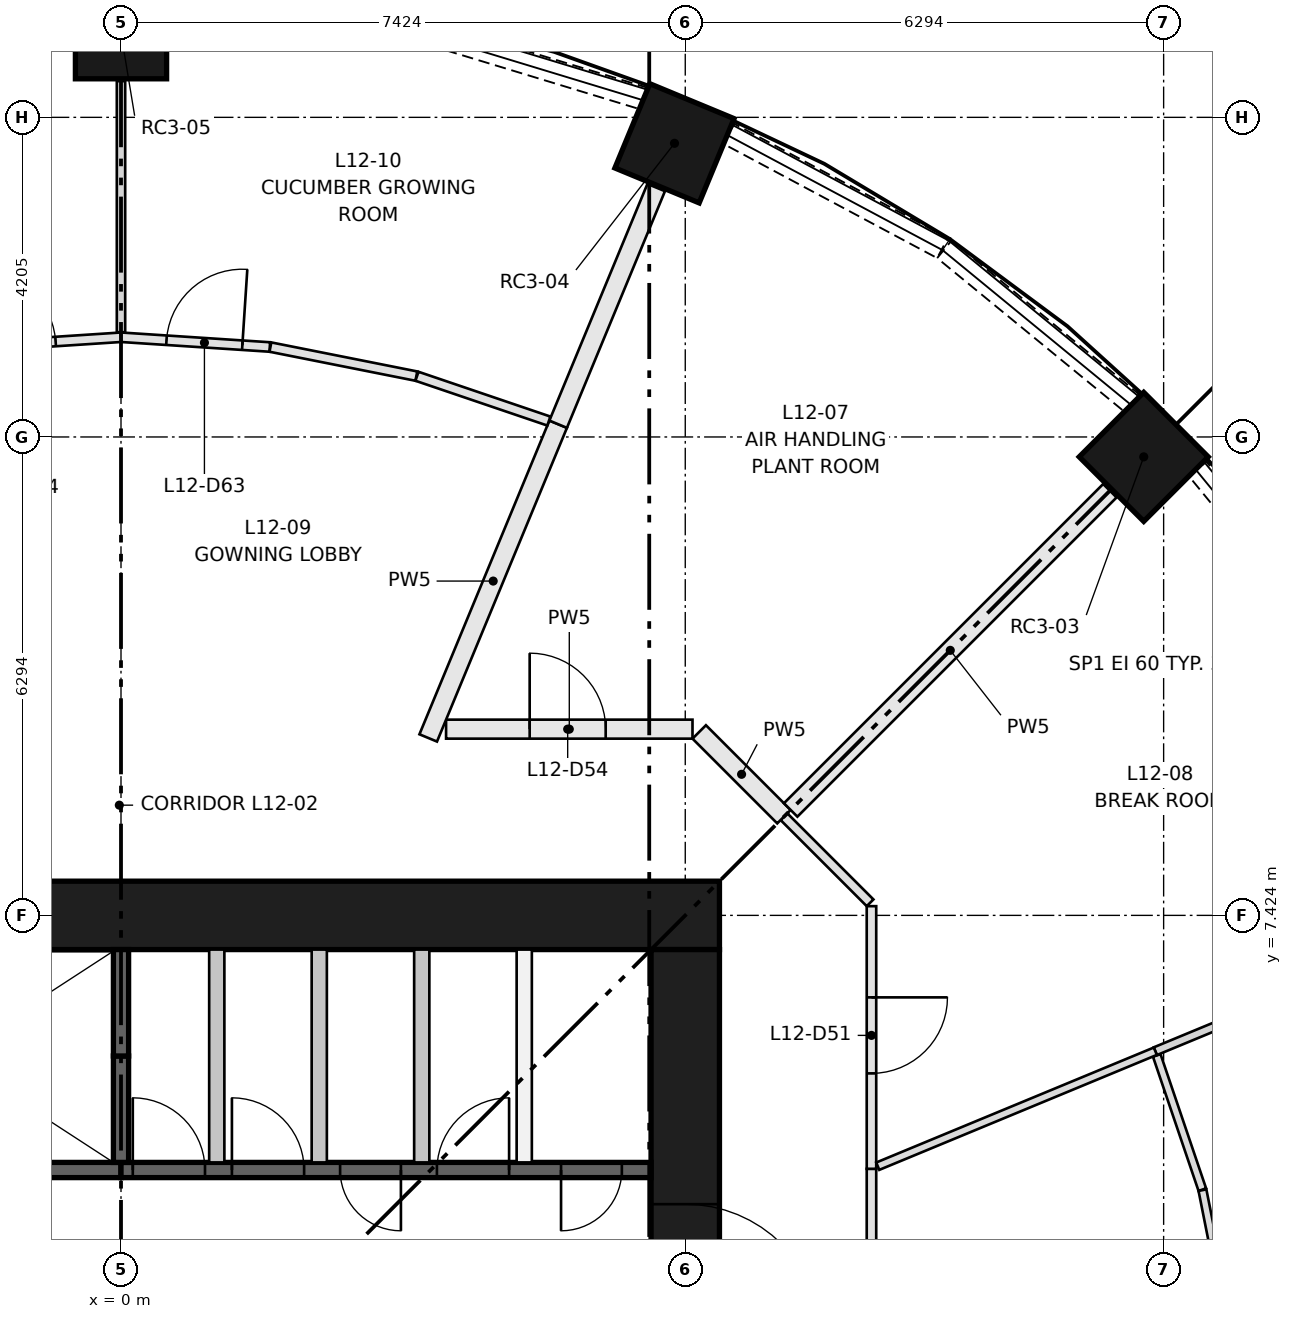
"""IFC4 building model, lengths in metres.
Left out: names, types, materials, properties, quantities, classifications, styles, units other than length and angle.
Written with IfcOpenShell. Run it as: python <this file> out.ifc"""

import sys

from ifc_helpers import new_model, si_unit, direction, frame, frame_2d, origin, origin_2d, place, context, subcontext, project, spatial, rectangle, extrude, element, fill, save


model = new_model("IFC4")
c1 = context("Model", 3, precision=1e-05, world=origin(), true_north=direction((0.0, 1.0)))
c2 = subcontext(c1, "Body", "Model", "MODEL_VIEW")
j1 = project(units=[si_unit("LENGTHUNIT", "METRE"), si_unit("PLANEANGLEUNIT", "RADIAN")], contexts=[c1])
p1 = place(None, origin())
s1 = spatial("IfcSite", under=j1, at=p1, CompositionType="ELEMENT")
p2 = place(p1, origin())
s2 = spatial("IfcBuilding", under=s1, at=p2, CompositionType="ELEMENT")
p3 = place(p2, frame((0.0, 0.0, 48.1)))
s3 = spatial("IfcBuildingStorey", under=s2, at=p3, CompositionType="ELEMENT", Elevation=48.1)
for number, where, z_axis, x_axis in (
    (1, (13.456, 13.456, 0.0), (0.0, 0.0, 1.0), (0.707, 0.707, 0.0)),
    (2, (7.282, 17.582, 0.0), (0.0, 0.0, 1.0), (0.383, 0.924, 0.0)),
    (3, (0.0, 19.03, 0.0), (0.0, 0.0, 1.0), (0.0, 1.0, 0.0)),
):
    element("IfcColumn", number, at=place(p3, frame(where, z_axis=z_axis, x_axis=x_axis)), inside=s3, PredefinedType="COLUMN", context=c2, shape_type="SweptSolid", body=[
        extrude(rectangle(XDim=1.2, YDim=1.2, at=origin_2d()), origin(), (0.0, 0.0, 1.0), 3.65),
    ])
p4 = place(p3, frame((-7.874, 7.424, 0.0), z_axis=(0.0, 0.0, 1.0), x_axis=(1.0, 0.0, 0.0)))
e4 = element("IfcWall", 4, at=p4, inside=s3, PredefinedType="SHEAR", context=c2, shape_type="SweptSolid", body=[
    extrude(rectangle(XDim=15.748, YDim=0.9, at=frame_2d((7.874, 0.0))), origin(), (0.0, 0.0, 1.0), 3.65),
])
p5 = place(p3, frame((7.424, -6.974, 0.0), z_axis=(0.0, 0.0, 1.0), x_axis=(0.0, 1.0, 0.0)))
e5 = element("IfcWall", 5, at=p5, inside=s3, PredefinedType="SHEAR", context=c2, shape_type="SweptSolid", body=[
    extrude(rectangle(XDim=13.948, YDim=0.9, at=frame_2d((6.974, 0.0))), origin(), (0.0, 0.0, 1.0), 3.65),
])
p6 = place(p5, frame((6.474, 0.0, 0.0)))
e6 = element("IfcOpeningElement", 6, at=p6, cuts=e5, PredefinedType="OPENING", context=c2, shape_type="SweptSolid", body=[
    extrude(rectangle(XDim=1.0, YDim=2.1, at=frame_2d((0.5, 1.05))), frame((0.0, 0.46, 0.0), z_axis=(0.0, -1.0, 0.0), x_axis=(1.0, 0.0, 0.0)), (0.0, 0.0, 1.0), 0.92),
])
p7 = place(p5, frame((3.35, 0.0, 0.0)))
e7 = element("IfcOpeningElement", 7, at=p7, cuts=e5, PredefinedType="OPENING", context=c2, shape_type="SweptSolid", body=[
    extrude(rectangle(XDim=1.8, YDim=2.1, at=frame_2d((0.9, 1.05))), frame((0.0, 0.46, 0.0), z_axis=(0.0, -1.0, 0.0), x_axis=(1.0, 0.0, 0.0)), (0.0, 0.0, 1.0), 0.92),
])
p8 = place(p5, frame((8.799, 0.0, 0.0)))
e8 = element("IfcOpeningElement", 8, at=p8, cuts=e5, PredefinedType="OPENING", context=c2, shape_type="SweptSolid", body=[
    extrude(rectangle(XDim=1.8, YDim=2.1, at=frame_2d((0.9, 1.05))), frame((0.0, 0.46, 0.0), z_axis=(0.0, -1.0, 0.0), x_axis=(1.0, 0.0, 0.0)), (0.0, 0.0, 1.0), 0.92),
])
p9 = place(p3, frame((-6.974, 4.074, 0.0), z_axis=(0.0, 0.0, 1.0), x_axis=(1.0, 0.0, 0.0)))
e9 = element("IfcWall", 9, at=p9, inside=s3, PredefinedType="SHEAR", context=c2, shape_type="SweptSolid", body=[
    extrude(rectangle(XDim=6.974, YDim=0.2, at=frame_2d((3.487, 0.0))), origin(), (0.0, 0.0, 1.0), 3.3),
])
p10 = place(p3, frame((0.0, 4.074, 0.0), z_axis=(0.0, 0.0, 1.0), x_axis=(1.0, 0.0, 0.0)))
e10 = element("IfcWall", 10, at=p10, inside=s3, PredefinedType="SHEAR", context=c2, shape_type="SweptSolid", body=[
    extrude(rectangle(XDim=6.974, YDim=0.2, at=frame_2d((3.487, 0.0))), origin(), (0.0, 0.0, 1.0), 3.3),
])
p11 = place(p10, frame((0.155, 0.0, 0.0)))
e11 = element("IfcOpeningElement", 11, at=p11, cuts=e10, PredefinedType="OPENING", context=c2, shape_type="SweptSolid", body=[
    extrude(rectangle(XDim=0.95, YDim=2.1, at=frame_2d((0.475, 1.05))), frame((0.0, 0.11, 0.0), z_axis=(0.0, -1.0, 0.0), x_axis=(1.0, 0.0, 0.0)), (0.0, 0.0, 1.0), 0.22),
])
p12 = place(p10, frame((1.459, 0.0, 0.0)))
e12 = element("IfcOpeningElement", 12, at=p12, cuts=e10, PredefinedType="OPENING", context=c2, shape_type="SweptSolid", body=[
    extrude(rectangle(XDim=0.95, YDim=2.1, at=frame_2d((0.475, 1.05))), frame((0.0, 0.11, 0.0), z_axis=(0.0, -1.0, 0.0), x_axis=(1.0, 0.0, 0.0)), (0.0, 0.0, 1.0), 0.22),
])
p13 = place(p10, frame((2.883, 0.0, 0.0)))
e13 = element("IfcOpeningElement", 13, at=p13, cuts=e10, PredefinedType="OPENING", context=c2, shape_type="SweptSolid", body=[
    extrude(rectangle(XDim=0.8, YDim=2.1, at=frame_2d((0.4, 1.05))), frame((0.0, 0.11, 0.0), z_axis=(0.0, -1.0, 0.0), x_axis=(1.0, 0.0, 0.0)), (0.0, 0.0, 1.0), 0.22),
])
p14 = place(p10, frame((4.156, 0.0, 0.0)))
e14 = element("IfcOpeningElement", 14, at=p14, cuts=e10, PredefinedType="OPENING", context=c2, shape_type="SweptSolid", body=[
    extrude(rectangle(XDim=0.95, YDim=2.1, at=frame_2d((0.475, 1.05))), frame((0.0, 0.11, 0.0), z_axis=(0.0, -1.0, 0.0), x_axis=(1.0, 0.0, 0.0)), (0.0, 0.0, 1.0), 0.22),
])
p15 = place(p10, frame((5.79, 0.0, 0.0)))
e15 = element("IfcOpeningElement", 15, at=p15, cuts=e10, PredefinedType="OPENING", context=c2, shape_type="SweptSolid", body=[
    extrude(rectangle(XDim=0.8, YDim=2.1, at=frame_2d((0.4, 1.05))), frame((0.0, 0.11, 0.0), z_axis=(0.0, -1.0, 0.0), x_axis=(1.0, 0.0, 0.0)), (0.0, 0.0, 1.0), 0.22),
])
p16 = place(p3, frame((0.0, 4.174, 0.0), z_axis=(0.0, 0.0, 1.0), x_axis=(0.0, 1.0, 0.0)))
e16 = element("IfcWall", 16, at=p16, inside=s3, PredefinedType="SHEAR", context=c2, shape_type="SweptSolid", body=[
    extrude(rectangle(XDim=1.4, YDim=0.2, at=frame_2d((0.7, 0.0))), origin(), (0.0, 0.0, 1.0), 3.3),
])
p17 = place(p3, frame((0.0, 5.574, 0.0), z_axis=(0.0, 0.0, 1.0), x_axis=(0.0, 1.0, 0.0)))
e17 = element("IfcWall", 17, at=p17, inside=s3, PredefinedType="SHEAR", context=c2, shape_type="SweptSolid", body=[
    extrude(rectangle(XDim=1.4, YDim=0.2, at=frame_2d((0.7, 0.0))), origin(), (0.0, 0.0, 1.0), 3.3),
])
for number, where, z_axis, x_axis in (
    (18, (1.26, 4.174, 0.0), (0.0, 0.0, 1.0), (0.0, 1.0, 0.0)),
    (19, (2.609, 4.174, 0.0), (0.0, 0.0, 1.0), (0.0, 1.0, 0.0)),
    (20, (3.957, 4.174, 0.0), (0.0, 0.0, 1.0), (0.0, 1.0, 0.0)),
    (21, (5.305, 4.174, 0.0), (0.0, 0.0, 1.0), (0.0, 1.0, 0.0)),
):
    element("IfcWall", number, at=place(p3, frame(where, z_axis=z_axis, x_axis=x_axis)), inside=s3, PredefinedType="PARTITIONING", context=c2, shape_type="SweptSolid", body=[
        extrude(rectangle(XDim=2.8, YDim=0.2, at=frame_2d((1.4, 0.0))), origin(), (0.0, 0.0, 1.0), 3.3),
    ])
for number, where, z_axis, x_axis in (
    (22, (16.188, 10.833, 0.0), (0.0, 0.0, 1.0), (-0.634, 0.773, 0.0)),
    (23, (13.298, 14.166, 0.0), (0.0, 0.0, 1.0), (-0.773, 0.634, 0.0)),
):
    element("IfcWall", number, at=place(p3, frame(where, z_axis=z_axis, x_axis=x_axis)), inside=s3, PredefinedType="SOLIDWALL", context=c2, shape_type="SweptSolid", body=[
        extrude(rectangle(XDim=3.188, YDim=0.3, at=frame_2d((1.594, 0.0))), origin(), (0.0, 0.0, 1.0), 0.9),
    ])
p18 = place(p3, frame((10.809, 16.204, 0.0), z_axis=(0.0, 0.0, 1.0), x_axis=(-0.881994263934, 0.471260138764, 0.0)))
e24 = element("IfcWall", 24, at=p18, inside=s3, PredefinedType="SOLIDWALL", context=c2, shape_type="SweptSolid", body=[
    extrude(rectangle(XDim=3.187, YDim=0.3, at=frame_2d((1.593, 0.0))), origin(), (0.0, 0.0, 1.0), 0.9),
])
p19 = place(p3, frame((6.865, 18.175, 0.0), z_axis=(0.0, 0.0, 1.0), x_axis=(-0.956849017819, 0.290585541792, 0.0)))
e25 = element("IfcWall", 25, at=p19, inside=s3, PredefinedType="SOLIDWALL", context=c2, shape_type="SweptSolid", body=[
    extrude(rectangle(XDim=3.188, YDim=0.3, at=frame_2d((1.594, 0.0))), origin(), (0.0, 0.0, 1.0), 0.9),
])
p20 = place(p3, frame((9.874, 4.09, 0.0), z_axis=(0.0, 0.0, 1.0), x_axis=(0.0, -1.0, 0.0)))
e26 = element("IfcWall", 26, at=p20, inside=s3, PredefinedType="PARTITIONING", context=c2, shape_type="SweptSolid", body=[
    extrude(rectangle(XDim=4.09, YDim=0.125, at=frame_2d((2.045, 0.0))), origin(), (0.0, 0.0, 1.0), 3.3),
])
p21 = place(p20, frame((1.5, 0.0, 0.0)))
e27 = element("IfcOpeningElement", 27, at=p21, cuts=e26, PredefinedType="OPENING", context=c2, shape_type="SweptSolid", body=[
    extrude(rectangle(XDim=1.0, YDim=2.1, at=frame_2d((0.5, 1.05))), frame((0.0, 0.073, 0.0), z_axis=(0.0, -1.0, 0.0), x_axis=(1.0, 0.0, 0.0)), (0.0, 0.0, 1.0), 0.145),
])
p22 = place(p3, frame((8.722, 8.722, 0.0), z_axis=(0.0, 0.0, 1.0), x_axis=(0.70718294931, -0.707030604857, 0.0)))
e28 = element("IfcWall", 28, at=p22, inside=s3, PredefinedType="PARTITIONING", context=c2, shape_type="SweptSolid", body=[
    extrude(rectangle(XDim=1.603, YDim=0.125, at=frame_2d((0.801, 0.0))), origin(), (0.0, 0.0, 1.0), 3.3),
])
p23 = place(p3, frame((9.874, 7.545, 0.0), z_axis=(0.0, 0.0, 1.0), x_axis=(0.0, -1.0, 0.0)))
e29 = element("IfcWall", 29, at=p23, inside=s3, PredefinedType="PARTITIONING", context=c2, shape_type="SweptSolid", body=[
    extrude(rectangle(XDim=3.455, YDim=0.125, at=frame_2d((1.728, 0.0))), origin(), (0.0, 0.0, 1.0), 3.3),
])
p24 = place(p23, frame((1.2, 0.0, 0.0)))
e30 = element("IfcOpeningElement", 30, at=p24, cuts=e29, PredefinedType="OPENING", context=c2, shape_type="SweptSolid", body=[
    extrude(rectangle(XDim=1.0, YDim=2.1, at=frame_2d((0.5, 1.05))), frame((0.0, 0.073, 0.0), z_axis=(0.0, -1.0, 0.0), x_axis=(1.0, 0.0, 0.0)), (0.0, 0.0, 1.0), 0.145),
])
p25 = place(p3, frame((4.277, 9.874, 0.0), z_axis=(0.0, 0.0, 1.0), x_axis=(1.0, 0.0, 0.0)))
e31 = element("IfcWall", 31, at=p25, inside=s3, PredefinedType="PARTITIONING", context=c2, shape_type="SweptSolid", body=[
    extrude(rectangle(XDim=3.242, YDim=0.25, at=frame_2d((1.621, 0.0))), origin(), (0.0, 0.0, 1.0), 3.3),
])
p26 = place(p25, frame((1.1, 0.0, 0.0)))
e32 = element("IfcOpeningElement", 32, at=p26, cuts=e31, PredefinedType="OPENING", context=c2, shape_type="SweptSolid", body=[
    extrude(rectangle(XDim=1.0, YDim=2.1, at=frame_2d((0.5, 1.05))), frame((0.0, 0.135, 0.0), z_axis=(0.0, -1.0, 0.0), x_axis=(1.0, 0.0, 0.0)), (0.0, 0.0, 1.0), 0.27),
])
p27 = place(p3, frame((7.608, 9.837, 0.0), z_axis=(0.0, 0.0, 1.0), x_axis=(0.707029353672, -0.707184200224, 0.0)))
e33 = element("IfcWall", 33, at=p27, inside=s3, PredefinedType="PARTITIONING", context=c2, shape_type="SweptSolid", body=[
    extrude(rectangle(XDim=1.577, YDim=0.25, at=frame_2d((0.788, 0.0))), origin(), (0.0, 0.0, 1.0), 3.3),
])
p28 = place(p3, frame((14.227, 3.816, 0.0), z_axis=(0.0, 0.0, 1.0), x_axis=(-0.321447308071, 0.946927467198, 0.0)))
e34 = element("IfcWall", 34, at=p28, inside=s3, PredefinedType="PARTITIONING", context=c2, shape_type="SweptSolid", body=[
    extrude(rectangle(XDim=1.865, YDim=0.105, at=frame_2d((0.932, 0.0))), origin(), (0.0, 0.0, 1.0), 3.3),
])
p29 = place(p3, frame((14.603, 1.926, 0.0), z_axis=(0.0, 0.0, 1.0), x_axis=(-0.195064501273, 0.980790416115, 0.0)))
e35 = element("IfcWall", 35, at=p29, inside=s3, PredefinedType="PARTITIONING", context=c2, shape_type="SweptSolid", body=[
    extrude(rectangle(XDim=1.92, YDim=0.105, at=frame_2d((0.96, 0.0))), origin(), (0.0, 0.0, 1.0), 3.3),
])
p30 = place(p3, frame((13.609, 5.637, 0.0), z_axis=(0.0, 0.0, 1.0), x_axis=(0.923870076355, 0.382706260748, 0.0)))
e36 = element("IfcWall", 36, at=p30, inside=s3, PredefinedType="PARTITIONING", context=c2, shape_type="SweptSolid", body=[
    extrude(rectangle(XDim=3.67, YDim=0.11, at=frame_2d((1.835, 0.0))), origin(), (0.0, 0.0, 1.0), 3.3),
])
p31 = place(p3, frame((9.957, 4.124, 0.0), z_axis=(0.0, 0.0, 1.0), x_axis=(0.923862514877, 0.382724513985, 0.0)))
e37 = element("IfcWall", 37, at=p31, inside=s3, PredefinedType="PARTITIONING", context=c2, shape_type="SweptSolid", body=[
    extrude(rectangle(XDim=3.953, YDim=0.105, at=frame_2d((1.977, 0.0))), origin(), (0.0, 0.0, 1.0), 3.3),
])
p32 = place(p3, frame((13.011, 13.011, 0.0), z_axis=(0.0, 0.0, 1.0), x_axis=(-0.707106781187, -0.707106781187, 0.0)))
e38 = element("IfcWall", 38, at=p32, inside=s3, PredefinedType="PARTITIONING", context=c2, shape_type="SweptSolid", body=[
    extrude(rectangle(XDim=5.94, YDim=0.25, at=frame_2d((2.97, 0.0))), origin(), (0.0, 0.0, 1.0), 3.3),
])
p33 = place(p3, frame((4.042, 9.759, 0.0), z_axis=(0.0, 0.0, 1.0), x_axis=(0.382697682956, 0.923873629595, 0.0)))
e39 = element("IfcWall", 39, at=p33, inside=s3, PredefinedType="PARTITIONING", context=c2, shape_type="SweptSolid", body=[
    extrude(rectangle(XDim=4.468, YDim=0.25, at=frame_2d((2.234, 0.0))), origin(), (0.0, 0.0, 1.0), 3.3),
])
p34 = place(p3, frame((5.752, 13.886, 0.0), z_axis=(0.0, 0.0, 1.0), x_axis=(0.382716478617, 0.923865843613, 0.0)))
e40 = element("IfcWall", 40, at=p34, inside=s3, PredefinedType="PARTITIONING", context=c2, shape_type="SweptSolid", body=[
    extrude(rectangle(XDim=3.37, YDim=0.25, at=frame_2d((1.685, 0.0))), origin(), (0.0, 0.0, 1.0), 3.3),
])
p35 = place(p3, frame((0.0, 15.03, 0.0), z_axis=(0.0, 0.0, 1.0), x_axis=(0.997855616904, -0.065453554619, 0.0)))
e41 = element("IfcWall", 41, at=p35, inside=s3, PredefinedType="PARTITIONING", context=c2, shape_type="SweptSolid", body=[
    extrude(rectangle(XDim=1.962, YDim=0.125, at=frame_2d((0.981, 0.0))), origin(), (0.0, 0.0, 1.0), 3.3),
])
p36 = place(p35, frame((0.6, 0.0, 0.0)))
e42 = element("IfcOpeningElement", 42, at=p36, cuts=e41, PredefinedType="OPENING", context=c2, shape_type="SweptSolid", body=[
    extrude(rectangle(XDim=1.0, YDim=2.1, at=frame_2d((0.5, 1.05))), frame((0.0, 0.073, 0.0), z_axis=(0.0, -1.0, 0.0), x_axis=(1.0, 0.0, 0.0)), (0.0, 0.0, 1.0), 0.145),
])
p37 = place(p3, frame((1.966, 14.901, 0.0), z_axis=(0.0, 0.0, 1.0), x_axis=(0.980795915473, -0.19503684829, 0.0)))
e43 = element("IfcWall", 43, at=p37, inside=s3, PredefinedType="PARTITIONING", context=c2, shape_type="SweptSolid", body=[
    extrude(rectangle(XDim=1.958, YDim=0.125, at=frame_2d((0.979, 0.0))), origin(), (0.0, 0.0, 1.0), 3.3),
])
p38 = place(p3, frame((3.894, 14.517, 0.0), z_axis=(0.0, 0.0, 1.0), x_axis=(0.946909907848, -0.321499030201, 0.0)))
e44 = element("IfcWall", 44, at=p38, inside=s3, PredefinedType="PARTITIONING", context=c2, shape_type="SweptSolid", body=[
    extrude(rectangle(XDim=1.832, YDim=0.125, at=frame_2d((0.916, 0.0))), origin(), (0.0, 0.0, 1.0), 3.3),
])
p39 = place(p3, frame((0.0, 15.096, 0.0), z_axis=(0.0, 0.0, 1.0), x_axis=(0.0, 1.0, 0.0)))
e45 = element("IfcWall", 45, at=p39, inside=s3, PredefinedType="PARTITIONING", context=c2, shape_type="SweptSolid", body=[
    extrude(rectangle(XDim=3.304, YDim=0.11, at=frame_2d((1.652, 0.0))), origin(), (0.0, 0.0, 1.0), 3.3),
])
p40 = place(p3, frame((-1.958, 14.902, 0.0), z_axis=(0.0, 0.0, 1.0), x_axis=(0.997855616904, 0.065453554619, 0.0)))
e46 = element("IfcWall", 46, at=p40, inside=s3, PredefinedType="PARTITIONING", context=c2, shape_type="SweptSolid", body=[
    extrude(rectangle(XDim=1.962, YDim=0.125, at=frame_2d((0.981, 0.0))), origin(), (0.0, 0.0, 1.0), 3.3),
])
p41 = place(p40, frame((0.1, 0.0, 0.0)))
e47 = element("IfcOpeningElement", 47, at=p41, cuts=e46, PredefinedType="OPENING", context=c2, shape_type="SweptSolid", body=[
    extrude(rectangle(XDim=1.0, YDim=2.1, at=frame_2d((0.5, 1.05))), frame((0.0, 0.073, 0.0), z_axis=(0.0, -1.0, 0.0), x_axis=(1.0, 0.0, 0.0)), (0.0, 0.0, 1.0), 0.145),
])
p42 = place(p11, origin())
e48 = element("IfcDoor", 48, at=p42, inside=s3, OperationType="SINGLE_SWING_LEFT", PredefinedType="DOOR", context=c2, shape_type="SweptSolid", body=[
    extrude(rectangle(XDim=0.95, YDim=2.1, at=frame_2d((0.475, 1.05))), frame((0.0, 0.025, 0.0), z_axis=(0.0, -1.0, 0.0), x_axis=(1.0, 0.0, 0.0)), (0.0, 0.0, 1.0), 0.05),
])
fill(e11, e48)
p43 = place(p12, origin())
e49 = element("IfcDoor", 49, at=p43, inside=s3, OperationType="SINGLE_SWING_LEFT", PredefinedType="DOOR", context=c2, shape_type="SweptSolid", body=[
    extrude(rectangle(XDim=0.95, YDim=2.1, at=frame_2d((0.475, 1.05))), frame((0.0, 0.025, 0.0), z_axis=(0.0, -1.0, 0.0), x_axis=(1.0, 0.0, 0.0)), (0.0, 0.0, 1.0), 0.05),
])
fill(e12, e49)
p44 = place(p13, frame((0.8, 0.0, 0.0), z_axis=(0.0, 0.0, 1.0), x_axis=(-1.0, 0.0, 0.0)))
e50 = element("IfcDoor", 50, at=p44, inside=s3, OperationType="SINGLE_SWING_RIGHT", PredefinedType="DOOR", context=c2, shape_type="SweptSolid", body=[
    extrude(rectangle(XDim=0.8, YDim=2.1, at=frame_2d((0.4, 1.05))), frame((0.0, 0.025, 0.0), z_axis=(0.0, -1.0, 0.0), x_axis=(1.0, 0.0, 0.0)), (0.0, 0.0, 1.0), 0.05),
])
fill(e13, e50)
p45 = place(p14, origin())
e51 = element("IfcDoor", 51, at=p45, inside=s3, OperationType="SINGLE_SWING_RIGHT", PredefinedType="DOOR", context=c2, shape_type="SweptSolid", body=[
    extrude(rectangle(XDim=0.95, YDim=2.1, at=frame_2d((0.475, 1.05))), frame((0.0, 0.025, 0.0), z_axis=(0.0, -1.0, 0.0), x_axis=(1.0, 0.0, 0.0)), (0.0, 0.0, 1.0), 0.05),
])
fill(e14, e51)
p46 = place(p15, frame((0.8, 0.0, 0.0), z_axis=(0.0, 0.0, 1.0), x_axis=(-1.0, 0.0, 0.0)))
e52 = element("IfcDoor", 52, at=p46, inside=s3, OperationType="SINGLE_SWING_LEFT", PredefinedType="DOOR", context=c2, shape_type="SweptSolid", body=[
    extrude(rectangle(XDim=0.8, YDim=2.1, at=frame_2d((0.4, 1.05))), frame((0.0, 0.025, 0.0), z_axis=(0.0, -1.0, 0.0), x_axis=(1.0, 0.0, 0.0)), (0.0, 0.0, 1.0), 0.05),
])
fill(e15, e52)
p47 = place(p8, frame((1.8, 0.0, 0.0), z_axis=(0.0, 0.0, 1.0), x_axis=(-1.0, 0.0, 0.0)))
e53 = element("IfcDoor", 53, at=p47, inside=s3, OperationType="DOUBLE_DOOR_SINGLE_SWING", PredefinedType="DOOR", context=c2, shape_type="SweptSolid", body=[
    extrude(rectangle(XDim=1.8, YDim=2.1, at=frame_2d((0.9, 1.05))), frame((0.0, 0.025, 0.0), z_axis=(0.0, -1.0, 0.0), x_axis=(1.0, 0.0, 0.0)), (0.0, 0.0, 1.0), 0.05),
])
fill(e8, e53)
p48 = place(p24, origin())
e54 = element("IfcDoor", 54, at=p48, inside=s3, OperationType="SINGLE_SWING_LEFT", PredefinedType="DOOR", context=c2, shape_type="SweptSolid", body=[
    extrude(rectangle(XDim=1.0, YDim=2.1, at=frame_2d((0.5, 1.05))), frame((0.0, 0.025, 0.0), z_axis=(0.0, -1.0, 0.0), x_axis=(1.0, 0.0, 0.0)), (0.0, 0.0, 1.0), 0.05),
])
fill(e30, e54)
p49 = place(p26, origin())
e55 = element("IfcDoor", 55, at=p49, inside=s3, OperationType="SINGLE_SWING_LEFT", PredefinedType="DOOR", context=c2, shape_type="SweptSolid", body=[
    extrude(rectangle(XDim=1.0, YDim=2.1, at=frame_2d((0.5, 1.05))), frame((0.0, 0.025, 0.0), z_axis=(0.0, -1.0, 0.0), x_axis=(1.0, 0.0, 0.0)), (0.0, 0.0, 1.0), 0.05),
])
fill(e32, e55)
p50 = place(p36, origin())
e56 = element("IfcDoor", 56, at=p50, inside=s3, OperationType="SINGLE_SWING_RIGHT", PredefinedType="DOOR", context=c2, shape_type="SweptSolid", body=[
    extrude(rectangle(XDim=1.0, YDim=2.1, at=frame_2d((0.5, 1.05))), frame((0.0, 0.025, 0.0), z_axis=(0.0, -1.0, 0.0), x_axis=(1.0, 0.0, 0.0)), (0.0, 0.0, 1.0), 0.05),
])
fill(e42, e56)
p51 = place(p41, origin())
e57 = element("IfcDoor", 57, at=p51, inside=s3, OperationType="SINGLE_SWING_LEFT", PredefinedType="DOOR", context=c2, shape_type="SweptSolid", body=[
    extrude(rectangle(XDim=1.0, YDim=2.1, at=frame_2d((0.5, 1.05))), frame((0.0, 0.025, 0.0), z_axis=(0.0, -1.0, 0.0), x_axis=(1.0, 0.0, 0.0)), (0.0, 0.0, 1.0), 0.05),
])
fill(e47, e57)
save(model, sys.argv[1])
